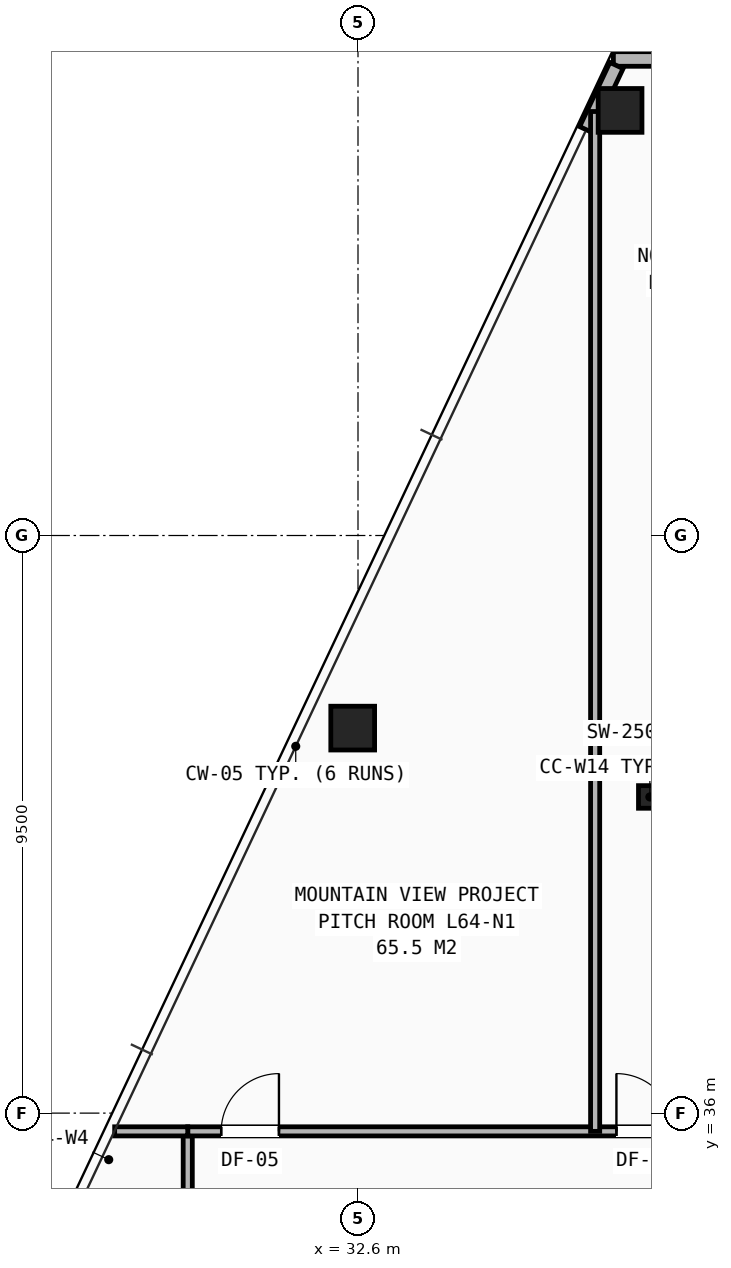
"""IFC4 building model, lengths in metres.
Left out: names, types, materials, properties, quantities, classifications, styles, units other than length and angle.
Written with IfcOpenShell. Run it as: python <this file> out.ifc"""

import sys

from ifc_helpers import new_model, si_unit, direction, frame, frame_2d, origin, origin_2d, place, context, subcontext, project, spatial, rectangle, hollow_rectangle, i_section, extrude, element, fill, save


model = new_model("IFC4")
c1 = context("Model", 3, precision=1e-05, world=origin(), true_north=direction((0.0, 1.0)))
c2 = subcontext(c1, "Body", "Model", "MODEL_VIEW")
j1 = project(units=[si_unit("LENGTHUNIT", "METRE"), si_unit("PLANEANGLEUNIT", "RADIAN")], contexts=[c1])
p1 = place(None, origin())
s1 = spatial("IfcSite", under=j1, at=p1, CompositionType="ELEMENT")
p2 = place(p1, origin())
s2 = spatial("IfcBuilding", under=s1, at=p2, CompositionType="ELEMENT")
p3 = place(p2, frame((0.0, 0.0, 225.9)))
s3 = spatial("IfcBuildingStorey", under=s2, at=p3, CompositionType="ELEMENT", Elevation=225.9)
p4 = place(p3, frame((37.4, 41.2, 0.0), z_axis=(0.0, 0.0, 1.0), x_axis=(1.0, 0.0, 0.0)))
e1 = element("IfcColumn", 1, at=p4, inside=s3, PredefinedType="COLUMN", context=c2, shape_type="SweptSolid", body=[
    extrude(i_section(OverallWidth=0.374, OverallDepth=0.372, WebThickness=0.016, FlangeThickness=0.026, at=origin_2d()), origin(), (0.0, 0.0, 1.0), 3.5),
])
for number, where, z_axis, x_axis in (
    (2, (36.91, 52.491, 0.0), (0.0, 0.0, 1.0), (1.0, 0.0, 0.0)),
    (3, (32.513, 42.332, 0.0), (0.0, 0.0, 1.0), (1.0, 0.0, 0.0)),
):
    element("IfcColumn", number, at=place(p3, frame(where, z_axis=z_axis, x_axis=x_axis)), inside=s3, PredefinedType="COLUMN", context=c2, shape_type="SweptSolid", body=[
        extrude(hollow_rectangle(XDim=0.72, YDim=0.72, WallThickness=0.05, at=origin_2d()), origin(), (0.0, 0.0, 1.0), 3.5),
    ])
p5 = place(p3, frame((36.8, 53.337, 0.0), z_axis=(0.0, 0.0, 1.0), x_axis=(1.0, 0.0, 0.0)))
e4 = element("IfcWall", 4, at=p5, inside=s3, PredefinedType="SHEAR", context=c2, shape_type="SweptSolid", body=[
    extrude(rectangle(XDim=6.4, YDim=0.24, at=frame_2d((3.2, 0.0))), origin(), (0.0, 0.0, 1.0), 2.623),
])
p6 = place(p3, frame((36.851, 53.23, 0.0), z_axis=(0.0, 0.0, 1.0), x_axis=(-0.426179687599, -0.904638532165, 0.0)))
e5 = element("IfcWall", 5, at=p6, inside=s3, PredefinedType="SHEAR", context=c2, shape_type="SweptSolid", body=[
    extrude(rectangle(XDim=1.167, YDim=0.24, at=frame_2d((0.584, 0.0))), origin(), (0.0, 0.0, 1.0), 2.623),
])
p7 = place(p3, frame((29.8, 16.4, 0.0), z_axis=(0.0, 0.0, 1.0), x_axis=(0.0, 1.0, 0.0)))
e6 = element("IfcWall", 6, at=p7, inside=s3, PredefinedType="PARTITIONING", context=c2, shape_type="SweptSolid", body=[
    extrude(rectangle(XDim=19.3, YDim=0.15, at=frame_2d((9.65, 0.0))), origin(), (0.0, 0.0, 1.0), 2.292),
])
p8 = place(p7, frame((0.35, 0.0, 0.0)))
e7 = element("IfcOpeningElement", 7, at=p8, cuts=e6, PredefinedType="OPENING", context=c2, shape_type="SweptSolid", body=[
    extrude(rectangle(XDim=0.95, YDim=2.1, at=frame_2d((0.475, 1.05))), frame((0.0, 0.085, 0.0), z_axis=(0.0, -1.0, 0.0), x_axis=(1.0, 0.0, 0.0)), (0.0, 0.0, 1.0), 0.17),
])
p9 = place(p7, frame((4.95, 0.0, 0.0)))
e8 = element("IfcOpeningElement", 8, at=p9, cuts=e6, PredefinedType="OPENING", context=c2, shape_type="SweptSolid", body=[
    extrude(rectangle(XDim=0.95, YDim=2.1, at=frame_2d((0.475, 1.05))), frame((0.0, 0.085, 0.0), z_axis=(0.0, -1.0, 0.0), x_axis=(1.0, 0.0, 0.0)), (0.0, 0.0, 1.0), 0.17),
])
p10 = place(p7, frame((11.45, 0.0, 0.0)))
e9 = element("IfcOpeningElement", 9, at=p10, cuts=e6, PredefinedType="OPENING", context=c2, shape_type="SweptSolid", body=[
    extrude(rectangle(XDim=0.95, YDim=2.1, at=frame_2d((0.475, 1.05))), frame((0.0, 0.085, 0.0), z_axis=(0.0, -1.0, 0.0), x_axis=(1.0, 0.0, 0.0)), (0.0, 0.0, 1.0), 0.17),
])
p11 = place(p7, frame((15.95, 0.0, 0.0)))
e10 = element("IfcOpeningElement", 10, at=p11, cuts=e6, PredefinedType="OPENING", context=c2, shape_type="SweptSolid", body=[
    extrude(rectangle(XDim=0.95, YDim=2.1, at=frame_2d((0.475, 1.05))), frame((0.0, 0.085, 0.0), z_axis=(0.0, -1.0, 0.0), x_axis=(1.0, 0.0, 0.0)), (0.0, 0.0, 1.0), 0.17),
])
p12 = place(p3, frame((29.8, 35.7, 0.0), z_axis=(0.0, 0.0, 1.0), x_axis=(1.0, 0.0, 0.0)))
e11 = element("IfcWall", 11, at=p12, inside=s3, PredefinedType="PARTITIONING", context=c2, shape_type="SweptSolid", body=[
    extrude(rectangle(XDim=9.45, YDim=0.15, at=frame_2d((4.725, 0.0))), origin(), (0.0, 0.0, 1.0), 2.628),
])
p13 = place(p12, frame((0.55, 0.0, 0.0)))
e12 = element("IfcOpeningElement", 12, at=p13, cuts=e11, PredefinedType="OPENING", context=c2, shape_type="SweptSolid", body=[
    extrude(rectangle(XDim=0.95, YDim=2.1, at=frame_2d((0.475, 1.05))), frame((0.0, 0.085, 0.0), z_axis=(0.0, -1.0, 0.0), x_axis=(1.0, 0.0, 0.0)), (0.0, 0.0, 1.0), 0.17),
])
p14 = place(p12, frame((7.05, 0.0, 0.0)))
e13 = element("IfcOpeningElement", 13, at=p14, cuts=e11, PredefinedType="OPENING", context=c2, shape_type="SweptSolid", body=[
    extrude(rectangle(XDim=0.95, YDim=2.1, at=frame_2d((0.475, 1.05))), frame((0.0, 0.085, 0.0), z_axis=(0.0, -1.0, 0.0), x_axis=(1.0, 0.0, 0.0)), (0.0, 0.0, 1.0), 0.17),
])
p15 = place(p3, frame((28.598, 35.7, 0.0), z_axis=(0.0, 0.0, 1.0), x_axis=(1.0, 0.0, 0.0)))
e14 = element("IfcWall", 14, at=p15, inside=s3, PredefinedType="PARTITIONING", context=c2, shape_type="SweptSolid", body=[
    extrude(rectangle(XDim=1.202, YDim=0.15, at=frame_2d((0.601, 0.0))), origin(), (0.0, 0.0, 1.0), 2.628),
])
p16 = place(p3, frame((36.5, 35.7, 0.0), z_axis=(0.0, 0.0, 1.0), x_axis=(0.0, 1.0, 0.0)))
e15 = element("IfcWall", 15, at=p16, inside=s3, PredefinedType="PARTITIONING", context=c2, shape_type="SweptSolid", body=[
    extrude(rectangle(XDim=16.773, YDim=0.15, at=frame_2d((8.387, 0.0))), origin(), (0.0, 0.0, 1.0), 2.292),
])
p17 = place(p13, origin())
e16 = element("IfcDoor", 16, at=p17, inside=s3, OperationType="SINGLE_SWING_RIGHT", PredefinedType="DOOR", context=c2, shape_type="SweptSolid", body=[
    extrude(rectangle(XDim=0.95, YDim=2.1, at=frame_2d((0.475, 1.05))), frame((0.0, 0.025, 0.0), z_axis=(0.0, -1.0, 0.0), x_axis=(1.0, 0.0, 0.0)), (0.0, 0.0, 1.0), 0.05),
])
fill(e12, e16)
p18 = place(p14, origin())
e17 = element("IfcDoor", 17, at=p18, inside=s3, OperationType="SINGLE_SWING_LEFT", PredefinedType="DOOR", context=c2, shape_type="SweptSolid", body=[
    extrude(rectangle(XDim=0.95, YDim=2.1, at=frame_2d((0.475, 1.05))), frame((0.0, 0.025, 0.0), z_axis=(0.0, -1.0, 0.0), x_axis=(1.0, 0.0, 0.0)), (0.0, 0.0, 1.0), 0.05),
])
fill(e13, e17)
save(model, sys.argv[1])
